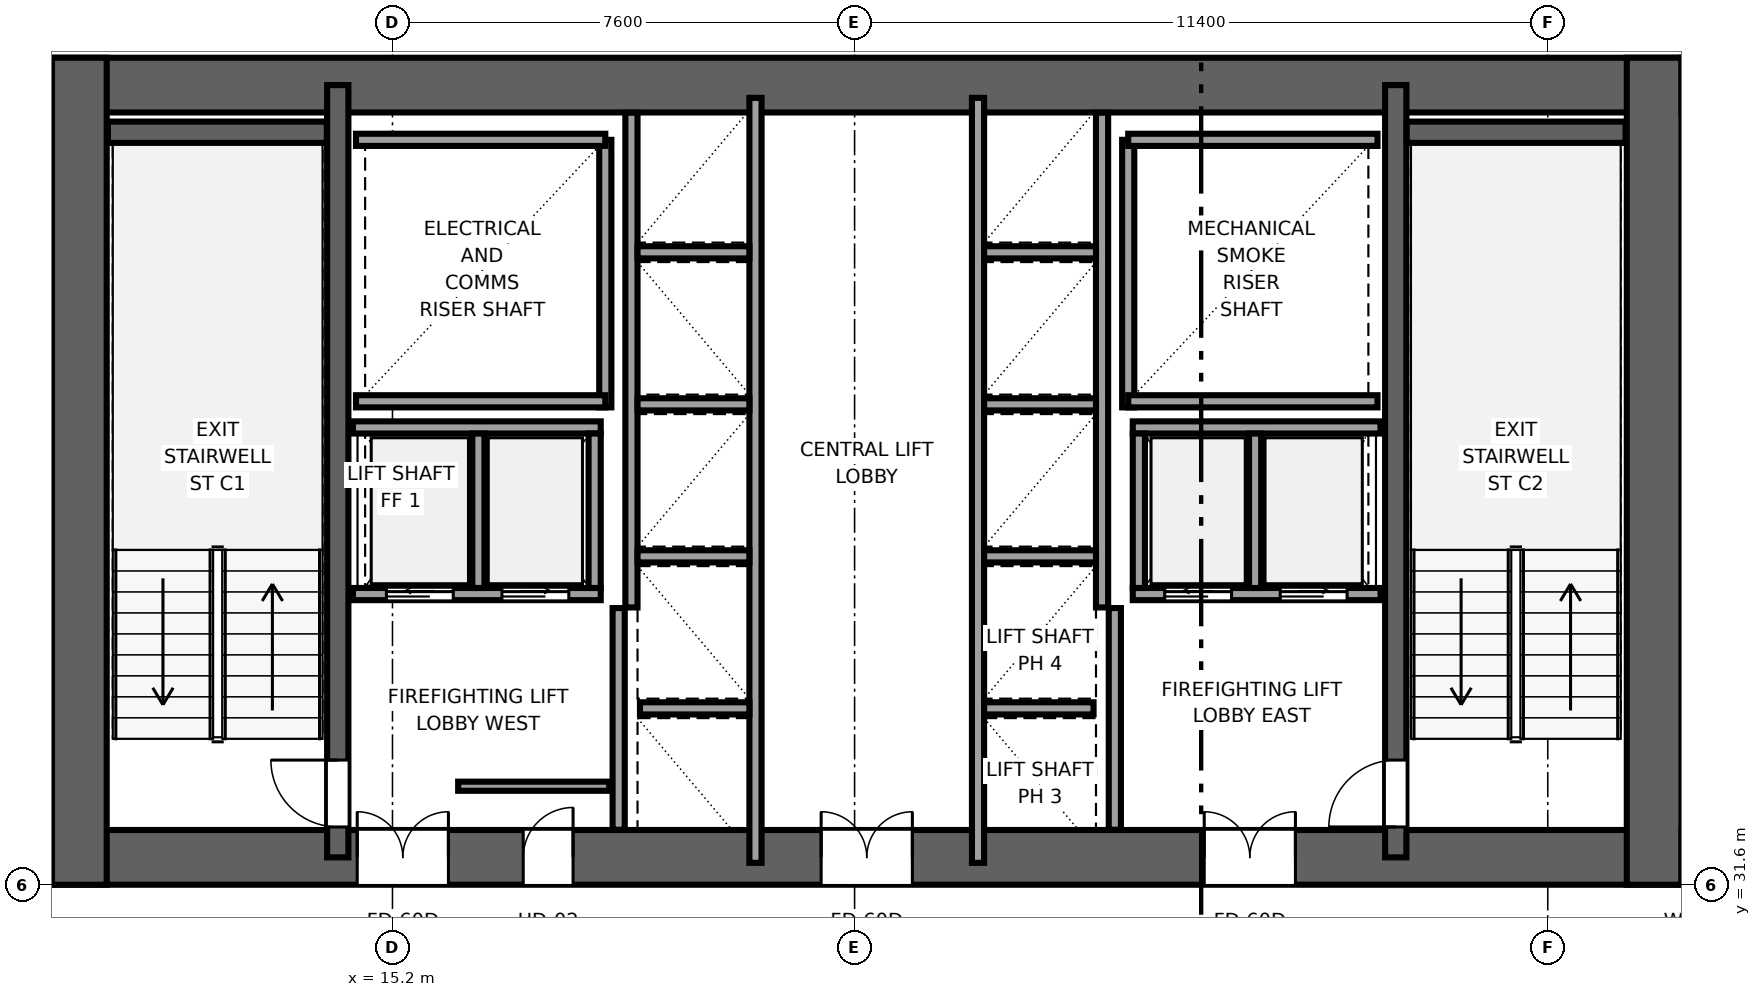
"""IFC4 building model, lengths in metres.
Left out: names, types, materials, properties, quantities, classifications, styles, units other than length and angle.
Written with IfcOpenShell. Run it as: python <this file> out.ifc"""

import sys

from ifc_helpers import new_model, si_unit, direction, frame, frame_2d, origin, place, context, subcontext, project, spatial, rectangle, extrude, source, transform, mapped, element, fill, save


model = new_model("IFC4")
c1 = context("Model", 3, precision=1e-05, world=origin(), true_north=direction((0.0, 1.0)))
c2 = subcontext(c1, "Body", "Model", "MODEL_VIEW")
j1 = project(units=[si_unit("LENGTHUNIT", "METRE"), si_unit("PLANEANGLEUNIT", "RADIAN")], contexts=[c1])
p1 = place(None, origin())
s1 = spatial("IfcSite", under=j1, at=p1, CompositionType="ELEMENT")
p2 = place(p1, origin())
s2 = spatial("IfcBuilding", under=s1, at=p2, CompositionType="ELEMENT")
p3 = place(p2, frame((0.0, 0.0, 46.2)))
s3 = spatial("IfcBuildingStorey", under=s2, at=p3, CompositionType="ELEMENT", Elevation=46.2)
p4 = place(p3, frame((9.6, 32.05, 0.0), z_axis=(0.0, 0.0, 1.0), x_axis=(1.0, 0.0, 0.0)))
e1 = element("IfcWall", 1, at=p4, inside=s3, PredefinedType="SHEAR", context=c2, shape_type="SweptSolid", body=[
    extrude(rectangle(XDim=26.8, YDim=0.9, at=frame_2d((13.4, 0.0))), origin(), (0.0, 0.0, 1.0), 3.55),
])
p5 = place(p4, frame((6.52, 0.0, 0.0), z_axis=(0.0, 0.0, 1.0), x_axis=(-1.0, 0.0, 0.0)))
e2 = element("IfcOpeningElement", 2, at=p5, cuts=e1, PredefinedType="OPENING", context=c2, shape_type="SweptSolid", body=[
    extrude(rectangle(XDim=1.5, YDim=2.04, at=frame_2d((0.75, 1.02))), frame((0.0, 0.46, 0.0), z_axis=(0.0, -1.0, 0.0), x_axis=(1.0, 0.0, 0.0)), (0.0, 0.0, 1.0), 0.92),
])
p6 = place(p4, frame((14.15, 0.0, 0.0), z_axis=(0.0, 0.0, 1.0), x_axis=(-1.0, 0.0, 0.0)))
e3 = element("IfcOpeningElement", 3, at=p6, cuts=e1, PredefinedType="OPENING", context=c2, shape_type="SweptSolid", body=[
    extrude(rectangle(XDim=1.5, YDim=2.04, at=frame_2d((0.75, 1.02))), frame((0.0, 0.46, 0.0), z_axis=(0.0, -1.0, 0.0), x_axis=(1.0, 0.0, 0.0)), (0.0, 0.0, 1.0), 0.92),
])
p7 = place(p4, frame((20.45, 0.0, 0.0), z_axis=(0.0, 0.0, 1.0), x_axis=(-1.0, 0.0, 0.0)))
e4 = element("IfcOpeningElement", 4, at=p7, cuts=e1, PredefinedType="OPENING", context=c2, shape_type="SweptSolid", body=[
    extrude(rectangle(XDim=1.5, YDim=2.04, at=frame_2d((0.75, 1.02))), frame((0.0, 0.46, 0.0), z_axis=(0.0, -1.0, 0.0), x_axis=(1.0, 0.0, 0.0)), (0.0, 0.0, 1.0), 0.92),
])
p8 = place(p4, frame((8.57, 0.0, 0.0), z_axis=(0.0, 0.0, 1.0), x_axis=(-1.0, 0.0, 0.0)))
e5 = element("IfcOpeningElement", 5, at=p8, cuts=e1, PredefinedType="OPENING", context=c2, shape_type="SweptSolid", body=[
    extrude(rectangle(XDim=0.82, YDim=2.01, at=frame_2d((0.41, 1.005))), frame((0.0, 0.46, 0.0), z_axis=(0.0, -1.0, 0.0), x_axis=(1.0, 0.0, 0.0)), (0.0, 0.0, 1.0), 0.92),
])
p9 = place(p3, frame((9.6, 44.75, 0.0), z_axis=(0.0, 0.0, 1.0), x_axis=(1.0, 0.0, 0.0)))
e6 = element("IfcWall", 6, at=p9, inside=s3, PredefinedType="SHEAR", context=c2, shape_type="SweptSolid", body=[
    extrude(rectangle(XDim=26.8, YDim=0.9, at=frame_2d((13.4, 0.0))), origin(), (0.0, 0.0, 1.0), 3.55),
])
for number, where, z_axis, x_axis in (
    (7, (10.05, 31.6, 0.0), (0.0, 0.0, 1.0), (0.0, 1.0, 0.0)),
    (8, (35.95, 31.6, 0.0), (0.0, 0.0, 1.0), (0.0, 1.0, 0.0)),
):
    element("IfcWall", number, at=place(p3, frame(where, z_axis=z_axis, x_axis=x_axis)), inside=s3, PredefinedType="SHEAR", context=c2, shape_type="SweptSolid", body=[
        extrude(rectangle(XDim=13.6, YDim=0.9, at=frame_2d((6.8, 0.0))), origin(), (0.0, 0.0, 1.0), 3.55),
    ])
p10 = place(p3, frame((14.3, 32.05, 0.0), z_axis=(0.0, 0.0, 1.0), x_axis=(0.0, 1.0, 0.0)))
e9 = element("IfcWall", 9, at=p10, inside=s3, PredefinedType="SHEAR", context=c2, shape_type="SweptSolid", body=[
    extrude(rectangle(XDim=12.7, YDim=0.35, at=frame_2d((6.35, 0.0))), origin(), (0.0, 0.0, 1.0), 3.55),
])
p11 = place(p10, frame((0.5, 0.0, 0.0)))
e10 = element("IfcOpeningElement", 10, at=p11, cuts=e9, PredefinedType="OPENING", context=c2, shape_type="SweptSolid", body=[
    extrude(rectangle(XDim=1.1, YDim=2.12, at=frame_2d((0.55, 1.06))), frame((0.0, 0.185, 0.0), z_axis=(0.0, -1.0, 0.0), x_axis=(1.0, 0.0, 0.0)), (0.0, 0.0, 1.0), 0.37),
])
p12 = place(p3, frame((31.7, 32.05, 0.0), z_axis=(0.0, 0.0, 1.0), x_axis=(0.0, 1.0, 0.0)))
e11 = element("IfcWall", 11, at=p12, inside=s3, PredefinedType="SHEAR", context=c2, shape_type="SweptSolid", body=[
    extrude(rectangle(XDim=12.7, YDim=0.35, at=frame_2d((6.35, 0.0))), origin(), (0.0, 0.0, 1.0), 3.55),
])
p13 = place(p12, frame((1.6, 0.0, 0.0), z_axis=(0.0, 0.0, 1.0), x_axis=(-1.0, 0.0, 0.0)))
e12 = element("IfcOpeningElement", 12, at=p13, cuts=e11, PredefinedType="OPENING", context=c2, shape_type="SweptSolid", body=[
    extrude(rectangle(XDim=1.1, YDim=2.12, at=frame_2d((0.55, 1.06))), frame((0.0, 0.185, 0.0), z_axis=(0.0, -1.0, 0.0), x_axis=(1.0, 0.0, 0.0)), (0.0, 0.0, 1.0), 0.37),
])
for number, where, z_axis, x_axis in (
    (13, (10.52, 43.975, 0.0), (0.0, 0.0, 1.0), (1.0, 0.0, 0.0)),
    (14, (31.88, 43.975, 0.0), (0.0, 0.0, 1.0), (1.0, 0.0, 0.0)),
):
    element("IfcWall", number, at=place(p3, frame(where, z_axis=z_axis, x_axis=x_axis)), inside=s3, PredefinedType="SHEAR", context=c2, shape_type="SweptSolid", body=[
        extrude(rectangle(XDim=3.6, YDim=0.35, at=frame_2d((1.8, 0.0))), origin(), (0.0, 0.0, 1.0), 3.55),
    ])
p14 = place(p3, frame((18.7, 39.45, 0.0), z_axis=(0.0, 0.0, 1.0), x_axis=(0.0, 1.0, 0.0)))
e15 = element("IfcWall", 15, at=p14, inside=s3, PredefinedType="SOLIDWALL", context=c2, shape_type="SweptSolid", body=[
    extrude(rectangle(XDim=4.4, YDim=0.2, at=frame_2d((2.2, 0.0))), origin(), (0.0, 0.0, 1.0), 3.37),
])
for number, where, z_axis, x_axis in (
    (16, (14.6, 39.55, 0.0), (0.0, 0.0, 1.0), (1.0, 0.0, 0.0)),
    (17, (14.6, 43.85, 0.0), (0.0, 0.0, 1.0), (1.0, 0.0, 0.0)),
):
    element("IfcWall", number, at=place(p3, frame(where, z_axis=z_axis, x_axis=x_axis)), inside=s3, PredefinedType="SOLIDWALL", context=c2, shape_type="SweptSolid", body=[
        extrude(rectangle(XDim=4.1, YDim=0.2, at=frame_2d((2.05, 0.0))), origin(), (0.0, 0.0, 1.0), 3.37),
    ])
p15 = place(p3, frame((27.3, 39.45, 0.0), z_axis=(0.0, 0.0, 1.0), x_axis=(0.0, 1.0, 0.0)))
e18 = element("IfcWall", 18, at=p15, inside=s3, PredefinedType="SOLIDWALL", context=c2, shape_type="SweptSolid", body=[
    extrude(rectangle(XDim=4.4, YDim=0.2, at=frame_2d((2.2, 0.0))), origin(), (0.0, 0.0, 1.0), 3.37),
])
for number, where, z_axis, x_axis in (
    (19, (27.3, 39.55, 0.0), (0.0, 0.0, 1.0), (1.0, 0.0, 0.0)),
    (20, (27.3, 43.85, 0.0), (0.0, 0.0, 1.0), (1.0, 0.0, 0.0)),
):
    element("IfcWall", number, at=place(p3, frame(where, z_axis=z_axis, x_axis=x_axis)), inside=s3, PredefinedType="SOLIDWALL", context=c2, shape_type="SweptSolid", body=[
        extrude(rectangle(XDim=4.1, YDim=0.2, at=frame_2d((2.05, 0.0))), origin(), (0.0, 0.0, 1.0), 3.37),
    ])
for number, where, z_axis, x_axis in (
    (21, (18.92, 32.504, 0.0), (0.0, 0.0, 1.0), (0.0, 1.0, 0.0)),
    (22, (27.08, 32.504, 0.0), (0.0, 0.0, 1.0), (0.0, 1.0, 0.0)),
):
    element("IfcWall", number, at=place(p3, frame(where, z_axis=z_axis, x_axis=x_axis)), inside=s3, PredefinedType="SOLIDWALL", context=c2, shape_type="SweptSolid", body=[
        extrude(rectangle(XDim=3.646, YDim=0.2, at=frame_2d((1.823, 0.0))), origin(), (0.0, 0.0, 1.0), 3.37),
    ])
p16 = place(p3, frame((21.17, 31.96, 0.0), z_axis=(0.0, 0.0, 1.0), x_axis=(0.0, 1.0, 0.0)))
e23 = element("IfcWall", 23, at=p16, inside=s3, PredefinedType="SOLIDWALL", context=c2, shape_type="SweptSolid", body=[
    extrude(rectangle(XDim=12.58, YDim=0.2, at=frame_2d((6.29, 0.0))), origin(), (0.0, 0.0, 1.0), 3.37),
])
p17 = place(p3, frame((19.13, 36.16, 0.0), z_axis=(0.0, 0.0, 1.0), x_axis=(0.0, 1.0, 0.0)))
e24 = element("IfcWall", 24, at=p17, inside=s3, PredefinedType="SOLIDWALL", context=c2, shape_type="SweptSolid", body=[
    extrude(rectangle(XDim=8.136, YDim=0.2, at=frame_2d((4.068, 0.0))), origin(), (0.0, 0.0, 1.0), 3.37),
])
p18 = place(p3, frame((19.27, 34.5, 0.0), z_axis=(0.0, 0.0, 1.0), x_axis=(1.0, 0.0, 0.0)))
e25 = element("IfcWall", 25, at=p18, inside=s3, PredefinedType="SOLIDWALL", context=c2, shape_type="SweptSolid", body=[
    extrude(rectangle(XDim=1.8, YDim=0.2, at=frame_2d((0.9, 0.0))), origin(), (0.0, 0.0, 1.0), 3.37),
])
for number, where, z_axis, x_axis in (
    (26, (19.23, 37.0, 0.0), (0.0, 0.0, 1.0), (1.0, 0.0, 0.0)),
    (27, (19.23, 39.5, 0.0), (0.0, 0.0, 1.0), (1.0, 0.0, 0.0)),
    (28, (19.23, 42.0, 0.0), (0.0, 0.0, 1.0), (1.0, 0.0, 0.0)),
):
    element("IfcWall", number, at=place(p3, frame(where, z_axis=z_axis, x_axis=x_axis)), inside=s3, PredefinedType="SOLIDWALL", context=c2, shape_type="SweptSolid", body=[
        extrude(rectangle(XDim=1.84, YDim=0.2, at=frame_2d((0.92, 0.0))), origin(), (0.0, 0.0, 1.0), 3.37),
    ])
p19 = place(p3, frame((27.375, 36.38, 0.0), z_axis=(0.0, 0.0, 1.0), x_axis=(1.0, 0.0, 0.0)))
e29 = element("IfcWall", 29, at=p19, inside=s3, PredefinedType="SOLIDWALL", context=c2, shape_type="SweptSolid", body=[
    extrude(rectangle(XDim=4.075, YDim=0.2, at=frame_2d((2.038, 0.0))), origin(), (0.0, 0.0, 1.0), 3.37),
])
p20 = place(p19, frame((0.525, 0.0, 0.0)))
e30 = element("IfcOpeningElement", 30, at=p20, cuts=e29, PredefinedType="OPENING", context=c2, shape_type="SweptSolid", body=[
    extrude(rectangle(XDim=1.1, YDim=2.12, at=frame_2d((0.55, 1.06))), frame((0.0, 0.11, 0.0), z_axis=(0.0, -1.0, 0.0), x_axis=(1.0, 0.0, 0.0)), (0.0, 0.0, 1.0), 0.22),
])
p21 = place(p19, frame((2.425, 0.0, 0.0)))
e31 = element("IfcOpeningElement", 31, at=p21, cuts=e29, PredefinedType="OPENING", context=c2, shape_type="SweptSolid", body=[
    extrude(rectangle(XDim=1.1, YDim=2.12, at=frame_2d((0.55, 1.06))), frame((0.0, 0.11, 0.0), z_axis=(0.0, -1.0, 0.0), x_axis=(1.0, 0.0, 0.0)), (0.0, 0.0, 1.0), 0.22),
])
p22 = place(p3, frame((27.375, 39.12, 0.0), z_axis=(0.0, 0.0, 1.0), x_axis=(1.0, 0.0, 0.0)))
e32 = element("IfcWall", 32, at=p22, inside=s3, PredefinedType="SOLIDWALL", context=c2, shape_type="SweptSolid", body=[
    extrude(rectangle(XDim=4.075, YDim=0.2, at=frame_2d((2.038, 0.0))), origin(), (0.0, 0.0, 1.0), 3.37),
])
for number, where, z_axis, x_axis in (
    (33, (27.475, 36.48, 0.0), (0.0, 0.0, 1.0), (0.0, 1.0, 0.0)),
    (34, (29.387, 36.48, 0.0), (0.0, 0.0, 1.0), (0.0, 1.0, 0.0)),
):
    element("IfcWall", number, at=place(p3, frame(where, z_axis=z_axis, x_axis=x_axis)), inside=s3, PredefinedType="SOLIDWALL", context=c2, shape_type="SweptSolid", body=[
        extrude(rectangle(XDim=2.54, YDim=0.2, at=frame_2d((1.27, 0.0))), origin(), (0.0, 0.0, 1.0), 3.37),
    ])
p23 = place(p3, frame((14.55, 36.38, 0.0), z_axis=(0.0, 0.0, 1.0), x_axis=(1.0, 0.0, 0.0)))
e35 = element("IfcWall", 35, at=p23, inside=s3, PredefinedType="SOLIDWALL", context=c2, shape_type="SweptSolid", body=[
    extrude(rectangle(XDim=4.075, YDim=0.2, at=frame_2d((2.038, 0.0))), origin(), (0.0, 0.0, 1.0), 3.37),
])
p24 = place(p23, frame((0.55, 0.0, 0.0)))
e36 = element("IfcOpeningElement", 36, at=p24, cuts=e35, PredefinedType="OPENING", context=c2, shape_type="SweptSolid", body=[
    extrude(rectangle(XDim=1.1, YDim=2.12, at=frame_2d((0.55, 1.06))), frame((0.0, 0.11, 0.0), z_axis=(0.0, -1.0, 0.0), x_axis=(1.0, 0.0, 0.0)), (0.0, 0.0, 1.0), 0.22),
])
p25 = place(p23, frame((2.45, 0.0, 0.0)))
e37 = element("IfcOpeningElement", 37, at=p25, cuts=e35, PredefinedType="OPENING", context=c2, shape_type="SweptSolid", body=[
    extrude(rectangle(XDim=1.1, YDim=2.12, at=frame_2d((0.55, 1.06))), frame((0.0, 0.11, 0.0), z_axis=(0.0, -1.0, 0.0), x_axis=(1.0, 0.0, 0.0)), (0.0, 0.0, 1.0), 0.22),
])
p26 = place(p3, frame((14.55, 39.12, 0.0), z_axis=(0.0, 0.0, 1.0), x_axis=(1.0, 0.0, 0.0)))
e38 = element("IfcWall", 38, at=p26, inside=s3, PredefinedType="SOLIDWALL", context=c2, shape_type="SweptSolid", body=[
    extrude(rectangle(XDim=4.075, YDim=0.2, at=frame_2d((2.038, 0.0))), origin(), (0.0, 0.0, 1.0), 3.37),
])
for number, where, z_axis, x_axis in (
    (39, (18.525, 36.48, 0.0), (0.0, 0.0, 1.0), (0.0, 1.0, 0.0)),
    (40, (16.613, 36.48, 0.0), (0.0, 0.0, 1.0), (0.0, 1.0, 0.0)),
):
    element("IfcWall", number, at=place(p3, frame(where, z_axis=z_axis, x_axis=x_axis)), inside=s3, PredefinedType="SOLIDWALL", context=c2, shape_type="SweptSolid", body=[
        extrude(rectangle(XDim=2.54, YDim=0.2, at=frame_2d((1.27, 0.0))), origin(), (0.0, 0.0, 1.0), 3.37),
    ])
p27 = place(p3, frame((24.83, 31.96, 0.0), z_axis=(0.0, 0.0, 1.0), x_axis=(0.0, 1.0, 0.0)))
e41 = element("IfcWall", 41, at=p27, inside=s3, PredefinedType="SOLIDWALL", context=c2, shape_type="SweptSolid", body=[
    extrude(rectangle(XDim=12.58, YDim=0.2, at=frame_2d((6.29, 0.0))), origin(), (0.0, 0.0, 1.0), 3.37),
])
p28 = place(p3, frame((26.87, 36.16, 0.0), z_axis=(0.0, 0.0, 1.0), x_axis=(0.0, 1.0, 0.0)))
e42 = element("IfcWall", 42, at=p28, inside=s3, PredefinedType="SOLIDWALL", context=c2, shape_type="SweptSolid", body=[
    extrude(rectangle(XDim=8.136, YDim=0.2, at=frame_2d((4.068, 0.0))), origin(), (0.0, 0.0, 1.0), 3.37),
])
p29 = place(p3, frame((24.93, 34.5, 0.0), z_axis=(0.0, 0.0, 1.0), x_axis=(1.0, 0.0, 0.0)))
e43 = element("IfcWall", 43, at=p29, inside=s3, PredefinedType="SOLIDWALL", context=c2, shape_type="SweptSolid", body=[
    extrude(rectangle(XDim=1.8, YDim=0.2, at=frame_2d((0.9, 0.0))), origin(), (0.0, 0.0, 1.0), 3.37),
])
for number, where, z_axis, x_axis in (
    (44, (24.93, 37.0, 0.0), (0.0, 0.0, 1.0), (1.0, 0.0, 0.0)),
    (45, (24.93, 39.5, 0.0), (0.0, 0.0, 1.0), (1.0, 0.0, 0.0)),
    (46, (24.93, 42.0, 0.0), (0.0, 0.0, 1.0), (1.0, 0.0, 0.0)),
):
    element("IfcWall", number, at=place(p3, frame(where, z_axis=z_axis, x_axis=x_axis)), inside=s3, PredefinedType="SOLIDWALL", context=c2, shape_type="SweptSolid", body=[
        extrude(rectangle(XDim=1.84, YDim=0.2, at=frame_2d((0.92, 0.0))), origin(), (0.0, 0.0, 1.0), 3.37),
    ])
p30 = place(p3, frame((16.28, 33.22, 0.0), z_axis=(0.0, 0.0, 1.0), x_axis=(1.0, 0.0, 0.0)))
e47 = element("IfcWall", 47, at=p30, inside=s3, PredefinedType="PARTITIONING", context=c2, shape_type="SweptSolid", body=[
    extrude(rectangle(XDim=2.485, YDim=0.15, at=frame_2d((1.242, 0.0))), origin(), (0.0, 0.0, 1.0), 3.37),
])
m1 = source(origin(), c2, "Body", "SweptSolid", [
    extrude(rectangle(XDim=1.1, YDim=2.12, at=frame_2d((0.55, 1.06))), frame((0.0, 0.025, 0.0), z_axis=(0.0, -1.0, 0.0), x_axis=(1.0, 0.0, 0.0)), (0.0, 0.0, 1.0), 0.05),
])
p31 = place(p11, origin())
e48 = element("IfcDoor", 48, at=p31, inside=s3, OperationType="SINGLE_SWING_RIGHT", PredefinedType="DOOR", context=c2, shape_type="MappedRepresentation", body=[
    mapped(m1, transform((0.0, 0.0, 0.0), x_axis=(1.0, 0.0, 0.0), y_axis=(0.0, 1.0, 0.0), z_axis=(0.0, 0.0, 1.0), scale=1.0)),
])
fill(e10, e48)
p32 = place(p13, origin())
e49 = element("IfcDoor", 49, at=p32, inside=s3, OperationType="SINGLE_SWING_LEFT", PredefinedType="DOOR", context=c2, shape_type="MappedRepresentation", body=[
    mapped(m1, transform((0.0, 0.0, 0.0), x_axis=(1.0, 0.0, 0.0), y_axis=(0.0, 1.0, 0.0), z_axis=(0.0, 0.0, 1.0), scale=1.0)),
])
fill(e12, e49)
m2 = source(origin(), c2, "Body", "SweptSolid", [
    extrude(rectangle(XDim=1.5, YDim=2.04, at=frame_2d((0.75, 1.02))), frame((0.0, 0.025, 0.0), z_axis=(0.0, -1.0, 0.0), x_axis=(1.0, 0.0, 0.0)), (0.0, 0.0, 1.0), 0.05),
])
p33 = place(p5, origin())
e50 = element("IfcDoor", 50, at=p33, inside=s3, OperationType="DOUBLE_DOOR_SINGLE_SWING", PredefinedType="DOOR", context=c2, shape_type="MappedRepresentation", body=[
    mapped(m2, transform((0.0, 0.0, 0.0), x_axis=(1.0, 0.0, 0.0), y_axis=(0.0, 1.0, 0.0), z_axis=(0.0, 0.0, 1.0), scale=1.0)),
])
fill(e2, e50)
p34 = place(p6, origin())
e51 = element("IfcDoor", 51, at=p34, inside=s3, OperationType="DOUBLE_DOOR_SINGLE_SWING", PredefinedType="DOOR", context=c2, shape_type="MappedRepresentation", body=[
    mapped(m2, transform((0.0, 0.0, 0.0), x_axis=(1.0, 0.0, 0.0), y_axis=(0.0, 1.0, 0.0), z_axis=(0.0, 0.0, 1.0), scale=1.0)),
])
fill(e3, e51)
p35 = place(p7, origin())
e52 = element("IfcDoor", 52, at=p35, inside=s3, OperationType="DOUBLE_DOOR_SINGLE_SWING", PredefinedType="DOOR", context=c2, shape_type="MappedRepresentation", body=[
    mapped(m2, transform((0.0, 0.0, 0.0), x_axis=(1.0, 0.0, 0.0), y_axis=(0.0, 1.0, 0.0), z_axis=(0.0, 0.0, 1.0), scale=1.0)),
])
fill(e4, e52)
m3 = source(origin(), c2, "Body", "SweptSolid", [
    extrude(rectangle(XDim=0.82, YDim=2.01, at=frame_2d((0.41, 1.005))), frame((0.0, 0.025, 0.0), z_axis=(0.0, -1.0, 0.0), x_axis=(1.0, 0.0, 0.0)), (0.0, 0.0, 1.0), 0.05),
])
p36 = place(p8, origin())
e53 = element("IfcDoor", 53, at=p36, inside=s3, OperationType="SINGLE_SWING_RIGHT", PredefinedType="DOOR", context=c2, shape_type="MappedRepresentation", body=[
    mapped(m3, transform((0.0, 0.0, 0.0), x_axis=(1.0, 0.0, 0.0), y_axis=(0.0, 1.0, 0.0), z_axis=(0.0, 0.0, 1.0), scale=1.0)),
])
fill(e5, e53)
m4 = source(origin(), c2, "Body", "SweptSolid", [
    extrude(rectangle(XDim=1.1, YDim=2.12, at=frame_2d((0.55, 1.06))), frame((0.0, 0.025, 0.0), z_axis=(0.0, -1.0, 0.0), x_axis=(1.0, 0.0, 0.0)), (0.0, 0.0, 1.0), 0.05),
])
p37 = place(p20, origin())
e54 = element("IfcDoor", 54, at=p37, inside=s3, OperationType="SLIDING_TO_LEFT", PredefinedType="DOOR", context=c2, shape_type="MappedRepresentation", body=[
    mapped(m4, transform((0.0, 0.0, 0.0), x_axis=(1.0, 0.0, 0.0), y_axis=(0.0, 1.0, 0.0), z_axis=(0.0, 0.0, 1.0), scale=1.0)),
])
fill(e30, e54)
p38 = place(p21, origin())
e55 = element("IfcDoor", 55, at=p38, inside=s3, OperationType="SLIDING_TO_RIGHT", PredefinedType="DOOR", context=c2, shape_type="MappedRepresentation", body=[
    mapped(m4, transform((0.0, 0.0, 0.0), x_axis=(1.0, 0.0, 0.0), y_axis=(0.0, 1.0, 0.0), z_axis=(0.0, 0.0, 1.0), scale=1.0)),
])
fill(e31, e55)
p39 = place(p24, origin())
e56 = element("IfcDoor", 56, at=p39, inside=s3, OperationType="SLIDING_TO_LEFT", PredefinedType="DOOR", context=c2, shape_type="MappedRepresentation", body=[
    mapped(m4, transform((0.0, 0.0, 0.0), x_axis=(1.0, 0.0, 0.0), y_axis=(0.0, 1.0, 0.0), z_axis=(0.0, 0.0, 1.0), scale=1.0)),
])
fill(e36, e56)
p40 = place(p25, origin())
e57 = element("IfcDoor", 57, at=p40, inside=s3, OperationType="SLIDING_TO_RIGHT", PredefinedType="DOOR", context=c2, shape_type="MappedRepresentation", body=[
    mapped(m4, transform((0.0, 0.0, 0.0), x_axis=(1.0, 0.0, 0.0), y_axis=(0.0, 1.0, 0.0), z_axis=(0.0, 0.0, 1.0), scale=1.0)),
])
fill(e37, e57)
save(model, sys.argv[1])
